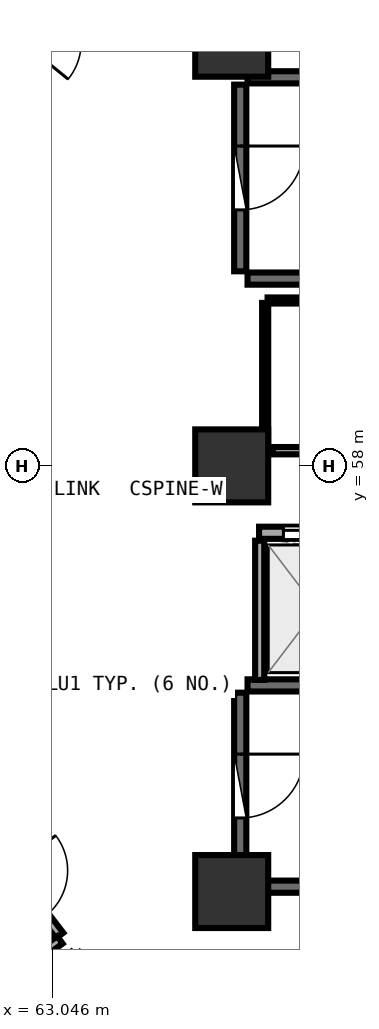
"""IFC4 building model, lengths in metres.
Left out: names, types, materials, properties, quantities, classifications, styles, units other than length and angle.
Written with IfcOpenShell. Run it as: python <this file> out.ifc"""

import sys

from ifc_helpers import new_model, si_unit, direction, frame, frame_2d, origin, origin_2d, place, context, subcontext, project, spatial, rectangle, extrude, element, fill, save


model = new_model("IFC4")
c1 = context("Model", 3, precision=1e-05, world=origin(), true_north=direction((0.0, 1.0)))
c2 = subcontext(c1, "Body", "Model", "MODEL_VIEW")
j1 = project(units=[si_unit("LENGTHUNIT", "METRE"), si_unit("PLANEANGLEUNIT", "RADIAN")], contexts=[c1])
p1 = place(None, origin())
s1 = spatial("IfcSite", under=j1, at=p1, CompositionType="ELEMENT")
p2 = place(p1, origin())
s2 = spatial("IfcBuilding", under=s1, at=p2, CompositionType="ELEMENT")
p3 = place(p2, frame((0.0, 0.0, 139.35)))
s3 = spatial("IfcBuildingStorey", under=s2, at=p3, CompositionType="ELEMENT", Elevation=139.35)
for number, where, z_axis, x_axis in (
    (1, (66.0, 51.0, 0.0), (0.0, 0.0, 1.0), (1.0, 0.0, 0.0)),
    (2, (66.0, 65.0, 0.0), (0.0, 0.0, 1.0), (1.0, 0.0, 0.0)),
    (3, (66.0, 58.0, 0.0), (0.0, 0.0, 1.0), (1.0, 0.0, 0.0)),
):
    element("IfcColumn", number, at=place(p3, frame(where, z_axis=z_axis, x_axis=x_axis)), inside=s3, PredefinedType="PILASTER", context=c2, shape_type="SweptSolid", body=[
        extrude(rectangle(XDim=1.2, YDim=1.2, at=origin_2d()), origin(), (0.0, 0.0, 1.0), 3.75),
    ])
for number, where, z_axis, x_axis in (
    (4, (66.26, 61.08, 0.0), (0.0, 0.0, 1.0), (1.0, 0.0, 0.0)),
    (5, (73.42, 64.39, 0.0), (0.0, 0.0, 1.0), (-1.0, 0.0, 0.0)),
):
    element("IfcWall", number, at=place(p3, frame(where, z_axis=z_axis, x_axis=x_axis)), inside=s3, PredefinedType="SHEAR", context=c2, shape_type="SweptSolid", body=[
        extrude(rectangle(XDim=7.16, YDim=0.2, at=frame_2d((3.58, 0.0))), origin(), (0.0, 0.0, 1.0), 3.49),
    ])
p4 = place(p3, frame((66.14, 64.27, 0.0), z_axis=(0.0, 0.0, 1.0), x_axis=(0.0, -1.0, 0.0)))
e6 = element("IfcWall", 6, at=p4, inside=s3, PredefinedType="SHEAR", context=c2, shape_type="SweptSolid", body=[
    extrude(rectangle(XDim=3.07, YDim=0.2, at=frame_2d((1.535, 0.0))), origin(), (0.0, 0.0, 1.0), 3.49),
])
p5 = place(p4, frame((1.01, 0.0, 0.0)))
e7 = element("IfcOpeningElement", 7, at=p5, cuts=e6, PredefinedType="OPENING", context=c2, shape_type="SweptSolid", body=[
    extrude(rectangle(XDim=1.05, YDim=2.1, at=frame_2d((0.525, 1.05))), frame((0.0, 0.11, 0.0), z_axis=(0.0, -1.0, 0.0), x_axis=(1.0, 0.0, 0.0)), (0.0, 0.0, 1.0), 0.22),
])
for number, where, z_axis, x_axis in (
    (8, (66.26, 51.08, 0.0), (0.0, 0.0, 1.0), (1.0, 0.0, 0.0)),
    (9, (73.42, 54.39, 0.0), (0.0, 0.0, 1.0), (-1.0, 0.0, 0.0)),
):
    element("IfcWall", number, at=place(p3, frame(where, z_axis=z_axis, x_axis=x_axis)), inside=s3, PredefinedType="SHEAR", context=c2, shape_type="SweptSolid", body=[
        extrude(rectangle(XDim=7.16, YDim=0.2, at=frame_2d((3.58, 0.0))), origin(), (0.0, 0.0, 1.0), 3.49),
    ])
p6 = place(p3, frame((66.14, 54.27, 0.0), z_axis=(0.0, 0.0, 1.0), x_axis=(0.0, -1.0, 0.0)))
e10 = element("IfcWall", 10, at=p6, inside=s3, PredefinedType="SHEAR", context=c2, shape_type="SweptSolid", body=[
    extrude(rectangle(XDim=3.07, YDim=0.2, at=frame_2d((1.535, 0.0))), origin(), (0.0, 0.0, 1.0), 3.49),
])
p7 = place(p6, frame((1.01, 0.0, 0.0)))
e11 = element("IfcOpeningElement", 11, at=p7, cuts=e10, PredefinedType="OPENING", context=c2, shape_type="SweptSolid", body=[
    extrude(rectangle(XDim=1.05, YDim=2.1, at=frame_2d((0.525, 1.05))), frame((0.0, 0.11, 0.0), z_axis=(0.0, -1.0, 0.0), x_axis=(1.0, 0.0, 0.0)), (0.0, 0.0, 1.0), 0.22),
])
p8 = place(p3, frame((66.45, 56.9, 0.0), z_axis=(0.0, 0.0, 1.0), x_axis=(1.0, 0.0, 0.0)))
e12 = element("IfcWall", 12, at=p8, inside=s3, PredefinedType="SOLIDWALL", context=c2, shape_type="SweptSolid", body=[
    extrude(rectangle(XDim=14.4, YDim=0.2, at=frame_2d((7.2, 0.0))), origin(), (0.0, 0.0, 1.0), 3.48),
])
p9 = place(p8, frame((0.4, 0.0, 0.0)))
e13 = element("IfcOpeningElement", 13, at=p9, cuts=e12, PredefinedType="OPENING", context=c2, shape_type="SweptSolid", body=[
    extrude(rectangle(XDim=1.1, YDim=2.1, at=frame_2d((0.55, 1.05))), frame((0.0, 0.11, 0.0), z_axis=(0.0, -1.0, 0.0), x_axis=(1.0, 0.0, 0.0)), (0.0, 0.0, 1.0), 0.22),
])
p10 = place(p8, frame((2.4, 0.0, 0.0)))
e14 = element("IfcOpeningElement", 14, at=p10, cuts=e12, PredefinedType="OPENING", context=c2, shape_type="SweptSolid", body=[
    extrude(rectangle(XDim=1.1, YDim=2.1, at=frame_2d((0.55, 1.05))), frame((0.0, 0.11, 0.0), z_axis=(0.0, -1.0, 0.0), x_axis=(1.0, 0.0, 0.0)), (0.0, 0.0, 1.0), 0.22),
])
p11 = place(p8, frame((4.4, 0.0, 0.0)))
e15 = element("IfcOpeningElement", 15, at=p11, cuts=e12, PredefinedType="OPENING", context=c2, shape_type="SweptSolid", body=[
    extrude(rectangle(XDim=1.1, YDim=2.1, at=frame_2d((0.55, 1.05))), frame((0.0, 0.11, 0.0), z_axis=(0.0, -1.0, 0.0), x_axis=(1.0, 0.0, 0.0)), (0.0, 0.0, 1.0), 0.22),
])
p12 = place(p3, frame((66.46, 54.48, 0.0), z_axis=(0.0, 0.0, 1.0), x_axis=(0.0, 1.0, 0.0)))
e16 = element("IfcWall", 16, at=p12, inside=s3, PredefinedType="PARTITIONING", context=c2, shape_type="SweptSolid", body=[
    extrude(rectangle(XDim=2.29, YDim=0.15, at=frame_2d((1.145, 0.0))), origin(), (0.0, 0.0, 1.0), 3.48),
])
p13 = place(p3, frame((66.675, 58.25, 0.0), z_axis=(0.0, 0.0, 1.0), x_axis=(1.0, 0.0, 0.0)))
e17 = element("IfcWall", 17, at=p13, inside=s3, PredefinedType="PARTITIONING", context=c2, shape_type="SweptSolid", body=[
    extrude(rectangle(XDim=5.715, YDim=0.12, at=frame_2d((2.857, 0.0))), origin(), (0.0, 0.0, 1.0), 3.48),
])
p14 = place(p13, frame((2.407, 0.0, 0.0)))
e18 = element("IfcOpeningElement", 18, at=p14, cuts=e17, PredefinedType="OPENING", context=c2, shape_type="SweptSolid", body=[
    extrude(rectangle(XDim=0.9, YDim=2.08, at=frame_2d((0.45, 1.04))), frame((0.0, 0.07, 0.0), z_axis=(0.0, -1.0, 0.0), x_axis=(1.0, 0.0, 0.0)), (0.0, 0.0, 1.0), 0.14),
])
p15 = place(p3, frame((63.426, 66.006, 0.0), z_axis=(0.0, 0.0, 1.0), x_axis=(-0.63192798372, -0.775027111391, 0.0)))
e19 = element("IfcWall", 19, at=p15, inside=s3, PredefinedType="PARTITIONING", context=c2, shape_type="SweptSolid", body=[
    extrude(rectangle(XDim=1.747, YDim=0.15, at=frame_2d((0.874, 0.0))), origin(), (0.0, 0.0, 1.0), 2.975),
])
p16 = place(p15, frame((0.399, 0.0, 0.0)))
e20 = element("IfcOpeningElement", 20, at=p16, cuts=e19, PredefinedType="OPENING", context=c2, shape_type="SweptSolid", body=[
    extrude(rectangle(XDim=0.95, YDim=2.08, at=frame_2d((0.475, 1.04))), frame((0.0, 0.085, 0.0), z_axis=(0.0, -1.0, 0.0), x_axis=(1.0, 0.0, 0.0)), (0.0, 0.0, 1.0), 0.17),
])
p17 = place(p3, frame((62.111, 51.658, 0.0), z_axis=(0.0, 0.0, 1.0), x_axis=(0.608307977949, -0.793701079729, 0.0)))
e21 = element("IfcWall", 21, at=p17, inside=s3, PredefinedType="PARTITIONING", context=c2, shape_type="SweptSolid", body=[
    extrude(rectangle(XDim=1.742, YDim=0.15, at=frame_2d((0.871, 0.0))), origin(), (0.0, 0.0, 1.0), 2.975),
])
p18 = place(p17, frame((0.396, 0.0, 0.0)))
e22 = element("IfcOpeningElement", 22, at=p18, cuts=e21, PredefinedType="OPENING", context=c2, shape_type="SweptSolid", body=[
    extrude(rectangle(XDim=0.95, YDim=2.08, at=frame_2d((0.475, 1.04))), frame((0.0, 0.085, 0.0), z_axis=(0.0, -1.0, 0.0), x_axis=(1.0, 0.0, 0.0)), (0.0, 0.0, 1.0), 0.17),
])
p19 = place(p3, frame((72.41, 60.72, 0.0), z_axis=(0.0, 0.0, 1.0), x_axis=(-1.0, 0.0, 0.0)))
e23 = element("IfcWall", 23, at=p19, inside=s3, PredefinedType="PARTITIONING", context=c2, shape_type="SweptSolid", body=[
    extrude(rectangle(XDim=5.82, YDim=0.1, at=frame_2d((2.91, 0.0))), origin(), (0.0, 0.0, 1.0), 3.48),
])
p20 = place(p3, frame((66.55, 60.68, 0.0), z_axis=(0.0, 0.0, 1.0), x_axis=(0.0, -1.0, 0.0)))
e24 = element("IfcWall", 24, at=p20, inside=s3, PredefinedType="PARTITIONING", context=c2, shape_type="SweptSolid", body=[
    extrude(rectangle(XDim=2.383, YDim=0.1, at=frame_2d((1.191, 0.0))), origin(), (0.0, 0.0, 1.0), 3.48),
])
p21 = place(p3, frame((63.175, 50.205, 0.0), z_axis=(0.0, 0.0, 1.0), x_axis=(-0.810227225477, -0.586115895618, 0.0)))
e25 = element("IfcWall", 25, at=p21, inside=s3, PredefinedType="PARTITIONING", context=c2, shape_type="SweptSolid", body=[
    extrude(rectangle(XDim=7.011, YDim=0.15, at=frame_2d((3.506, 0.0))), origin(), (0.0, 0.0, 1.0), 3.175),
])
p22 = place(p5, origin())
e26 = element("IfcDoor", 26, at=p22, inside=s3, OperationType="SINGLE_SWING_LEFT", PredefinedType="DOOR", context=c2, shape_type="SweptSolid", body=[
    extrude(rectangle(XDim=1.05, YDim=2.1, at=frame_2d((0.525, 1.05))), frame((0.0, 0.025, 0.0), z_axis=(0.0, -1.0, 0.0), x_axis=(1.0, 0.0, 0.0)), (0.0, 0.0, 1.0), 0.05),
])
fill(e7, e26)
p23 = place(p7, origin())
e27 = element("IfcDoor", 27, at=p23, inside=s3, OperationType="SINGLE_SWING_LEFT", PredefinedType="DOOR", context=c2, shape_type="SweptSolid", body=[
    extrude(rectangle(XDim=1.05, YDim=2.1, at=frame_2d((0.525, 1.05))), frame((0.0, 0.025, 0.0), z_axis=(0.0, -1.0, 0.0), x_axis=(1.0, 0.0, 0.0)), (0.0, 0.0, 1.0), 0.05),
])
fill(e11, e27)
p24 = place(p9, origin())
e28 = element("IfcDoor", 28, at=p24, inside=s3, OperationType="DOUBLE_DOOR_SLIDING", PredefinedType="DOOR", context=c2, shape_type="SweptSolid", body=[
    extrude(rectangle(XDim=1.1, YDim=2.1, at=frame_2d((0.55, 1.05))), frame((0.0, 0.025, 0.0), z_axis=(0.0, -1.0, 0.0), x_axis=(1.0, 0.0, 0.0)), (0.0, 0.0, 1.0), 0.05),
])
fill(e13, e28)
save(model, sys.argv[1])
